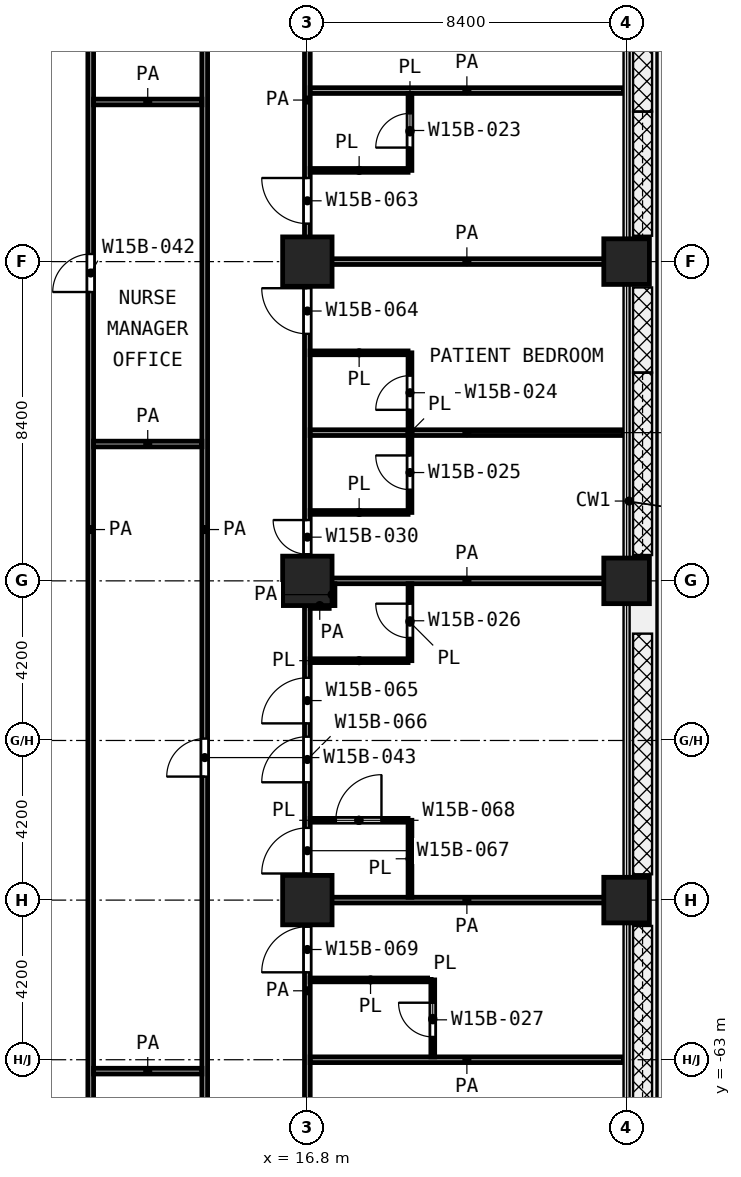
"""IFC4 building model, lengths in metres.
Left out: names, types, materials, properties, quantities, classifications, styles, units other than length and angle.
Written with IfcOpenShell. Run it as: python <this file> out.ifc"""

import sys

from ifc_helpers import new_model, si_unit, direction, frame, frame_2d, origin, origin_2d, place, context, subcontext, project, spatial, rectangle, extrude, element, fill, save


model = new_model("IFC4")
c1 = context("Model", 3, precision=1e-05, world=origin(), true_north=direction((0.0, 1.0)))
c2 = subcontext(c1, "Body", "Model", "MODEL_VIEW")
j1 = project(units=[si_unit("LENGTHUNIT", "METRE"), si_unit("PLANEANGLEUNIT", "RADIAN")], contexts=[c1])
p1 = place(None, origin())
s1 = spatial("IfcSite", under=j1, at=p1, CompositionType="ELEMENT")
p2 = place(p1, origin())
s2 = spatial("IfcBuilding", under=s1, at=p2, CompositionType="ELEMENT")
p3 = place(p2, frame((0.0, 0.0, 85.4)))
s3 = spatial("IfcBuildingStorey", under=s2, at=p3, CompositionType="ELEMENT", Elevation=85.4)
p4 = place(p3, frame((16.8, -42.0, 0.0), z_axis=(0.0, 0.0, 1.0), x_axis=(1.0, 0.0, 0.0)))
e1 = element("IfcColumn", 1, at=p4, inside=s3, PredefinedType="COLUMN", context=c2, shape_type="SweptSolid", body=[
    extrude(rectangle(XDim=1.3, YDim=1.3, at=origin_2d()), origin(), (0.0, 0.0, 1.0), 4.2),
])
p5 = place(p3, frame((25.2, -42.0, 0.0), z_axis=(0.0, 0.0, 1.0), x_axis=(1.0, 0.0, 0.0)))
e2 = element("IfcColumn", 2, at=p5, inside=s3, PredefinedType="COLUMN", context=c2, shape_type="SweptSolid", body=[
    extrude(rectangle(XDim=1.2, YDim=1.2, at=origin_2d()), origin(), (0.0, 0.0, 1.0), 4.2),
])
p6 = place(p3, frame((16.8, -50.4, 0.0), z_axis=(0.0, 0.0, 1.0), x_axis=(1.0, 0.0, 0.0)))
e3 = element("IfcColumn", 3, at=p6, inside=s3, PredefinedType="COLUMN", context=c2, shape_type="SweptSolid", body=[
    extrude(rectangle(XDim=1.3, YDim=1.3, at=origin_2d()), origin(), (0.0, 0.0, 1.0), 4.2),
])
p7 = place(p3, frame((25.2, -50.4, 0.0), z_axis=(0.0, 0.0, 1.0), x_axis=(1.0, 0.0, 0.0)))
e4 = element("IfcColumn", 4, at=p7, inside=s3, PredefinedType="COLUMN", context=c2, shape_type="SweptSolid", body=[
    extrude(rectangle(XDim=1.2, YDim=1.2, at=origin_2d()), origin(), (0.0, 0.0, 1.0), 4.2),
])
p8 = place(p3, frame((16.8, -58.8, 0.0), z_axis=(0.0, 0.0, 1.0), x_axis=(1.0, 0.0, 0.0)))
e5 = element("IfcColumn", 5, at=p8, inside=s3, PredefinedType="COLUMN", context=c2, shape_type="SweptSolid", body=[
    extrude(rectangle(XDim=1.3, YDim=1.3, at=origin_2d()), origin(), (0.0, 0.0, 1.0), 4.2),
])
p9 = place(p3, frame((25.2, -58.8, 0.0), z_axis=(0.0, 0.0, 1.0), x_axis=(1.0, 0.0, 0.0)))
e6 = element("IfcColumn", 6, at=p9, inside=s3, PredefinedType="COLUMN", context=c2, shape_type="SweptSolid", body=[
    extrude(rectangle(XDim=1.2, YDim=1.2, at=origin_2d()), origin(), (0.0, 0.0, 1.0), 4.2),
])
p10 = place(p3, frame((16.875, -60.9, 0.0), z_axis=(0.0, 0.0, 1.0), x_axis=(1.0, 0.0, 0.0)))
e7 = element("IfcWall", 7, at=p10, inside=s3, PredefinedType="PARTITIONING", context=c2, shape_type="SweptSolid", body=[
    extrude(rectangle(XDim=3.175, YDim=0.1, at=frame_2d((1.587, 0.0))), origin(), (0.0, 0.0, 1.0), 3.9),
])
p11 = place(p3, frame((16.875, -56.7, 0.0), z_axis=(0.0, 0.0, 1.0), x_axis=(1.0, 0.0, 0.0)))
e8 = element("IfcWall", 8, at=p11, inside=s3, PredefinedType="PARTITIONING", context=c2, shape_type="SweptSolid", body=[
    extrude(rectangle(XDim=2.575, YDim=0.1, at=frame_2d((1.288, 0.0))), origin(), (0.0, 0.0, 1.0), 3.9),
])
p12 = place(p11, frame((0.675, 0.0, 0.0)))
e9 = element("IfcOpeningElement", 9, at=p12, cuts=e8, PredefinedType="OPENING", context=c2, shape_type="SweptSolid", body=[
    extrude(rectangle(XDim=1.2, YDim=2.1, at=frame_2d((0.6, 1.05))), frame((0.0, 0.06, 0.0), z_axis=(0.0, -1.0, 0.0), x_axis=(1.0, 0.0, 0.0)), (0.0, 0.0, 1.0), 0.12),
])
for number, where, z_axis, x_axis in (
    (10, (16.875, -52.5, 0.0), (0.0, 0.0, 1.0), (1.0, 0.0, 0.0)),
    (11, (16.875, -48.6, 0.0), (0.0, 0.0, 1.0), (1.0, 0.0, 0.0)),
    (12, (16.875, -44.4, 0.0), (0.0, 0.0, 1.0), (1.0, 0.0, 0.0)),
    (13, (16.875, -39.6, 0.0), (0.0, 0.0, 1.0), (1.0, 0.0, 0.0)),
):
    element("IfcWall", number, at=place(p3, frame(where, z_axis=z_axis, x_axis=x_axis)), inside=s3, PredefinedType="PARTITIONING", context=c2, shape_type="SweptSolid", body=[
        extrude(rectangle(XDim=2.575, YDim=0.1, at=frame_2d((1.288, 0.0))), origin(), (0.0, 0.0, 1.0), 3.9),
    ])
p13 = place(p3, frame((19.5, -58.725, 0.0), z_axis=(0.0, 0.0, 1.0), x_axis=(0.0, 1.0, 0.0)))
e14 = element("IfcWall", 14, at=p13, inside=s3, PredefinedType="PARTITIONING", context=c2, shape_type="SweptSolid", body=[
    extrude(rectangle(XDim=2.025, YDim=0.1, at=frame_2d((1.013, 0.0))), origin(), (0.0, 0.0, 1.0), 3.9),
])
p14 = place(p3, frame((19.5, -52.5, 0.0), z_axis=(0.0, 0.0, 1.0), x_axis=(0.0, 1.0, 0.0)))
e15 = element("IfcWall", 15, at=p14, inside=s3, PredefinedType="PARTITIONING", context=c2, shape_type="SweptSolid", body=[
    extrude(rectangle(XDim=2.025, YDim=0.1, at=frame_2d((1.012, 0.0))), origin(), (0.0, 0.0, 1.0), 3.9),
])
p15 = place(p14, frame((0.6, 0.0, 0.0)))
e16 = element("IfcOpeningElement", 16, at=p15, cuts=e15, PredefinedType="OPENING", context=c2, shape_type="SweptSolid", body=[
    extrude(rectangle(XDim=0.9, YDim=2.1, at=frame_2d((0.45, 1.05))), frame((0.0, 0.06, 0.0), z_axis=(0.0, -1.0, 0.0), x_axis=(1.0, 0.0, 0.0)), (0.0, 0.0, 1.0), 0.12),
])
p16 = place(p3, frame((19.5, -48.6, 0.0), z_axis=(0.0, 0.0, 1.0), x_axis=(0.0, 1.0, 0.0)))
e17 = element("IfcWall", 17, at=p16, inside=s3, PredefinedType="PARTITIONING", context=c2, shape_type="SweptSolid", body=[
    extrude(rectangle(XDim=4.2, YDim=0.1, at=frame_2d((2.1, 0.0))), origin(), (0.0, 0.0, 1.0), 3.9),
])
p17 = place(p16, frame((2.7, 0.0, 0.0)))
e18 = element("IfcOpeningElement", 18, at=p17, cuts=e17, PredefinedType="OPENING", context=c2, shape_type="SweptSolid", body=[
    extrude(rectangle(XDim=0.9, YDim=2.1, at=frame_2d((0.45, 1.05))), frame((0.0, 0.06, 0.0), z_axis=(0.0, -1.0, 0.0), x_axis=(1.0, 0.0, 0.0)), (0.0, 0.0, 1.0), 0.12),
])
p18 = place(p16, frame((0.6, 0.0, 0.0)))
e19 = element("IfcOpeningElement", 19, at=p18, cuts=e17, PredefinedType="OPENING", context=c2, shape_type="SweptSolid", body=[
    extrude(rectangle(XDim=0.9, YDim=2.1, at=frame_2d((0.45, 1.05))), frame((0.0, 0.06, 0.0), z_axis=(0.0, -1.0, 0.0), x_axis=(1.0, 0.0, 0.0)), (0.0, 0.0, 1.0), 0.12),
])
p19 = place(p3, frame((19.5, -39.6, 0.0), z_axis=(0.0, 0.0, 1.0), x_axis=(0.0, 1.0, 0.0)))
e20 = element("IfcWall", 20, at=p19, inside=s3, PredefinedType="PARTITIONING", context=c2, shape_type="SweptSolid", body=[
    extrude(rectangle(XDim=2.025, YDim=0.1, at=frame_2d((1.013, 0.0))), origin(), (0.0, 0.0, 1.0), 3.9),
])
p20 = place(p19, frame((0.6, 0.0, 0.0)))
e21 = element("IfcOpeningElement", 21, at=p20, cuts=e20, PredefinedType="OPENING", context=c2, shape_type="SweptSolid", body=[
    extrude(rectangle(XDim=0.9, YDim=2.1, at=frame_2d((0.45, 1.05))), frame((0.0, 0.06, 0.0), z_axis=(0.0, -1.0, 0.0), x_axis=(1.0, 0.0, 0.0)), (0.0, 0.0, 1.0), 0.12),
])
p21 = place(p3, frame((20.1, -62.925, 0.0), z_axis=(0.0, 0.0, 1.0), x_axis=(0.0, 1.0, 0.0)))
e22 = element("IfcWall", 22, at=p21, inside=s3, PredefinedType="PARTITIONING", context=c2, shape_type="SweptSolid", body=[
    extrude(rectangle(XDim=2.025, YDim=0.1, at=frame_2d((1.013, 0.0))), origin(), (0.0, 0.0, 1.0), 3.9),
])
p22 = place(p21, frame((0.525, 0.0, 0.0)))
e23 = element("IfcOpeningElement", 23, at=p22, cuts=e22, PredefinedType="OPENING", context=c2, shape_type="SweptSolid", body=[
    extrude(rectangle(XDim=0.9, YDim=2.1, at=frame_2d((0.45, 1.05))), frame((0.0, 0.06, 0.0), z_axis=(0.0, -1.0, 0.0), x_axis=(1.0, 0.0, 0.0)), (0.0, 0.0, 1.0), 0.12),
])
p23 = place(p3, frame((11.175, -63.3, 0.0), z_axis=(0.0, 0.0, 1.0), x_axis=(1.0, 0.0, 0.0)))
e24 = element("IfcWall", 24, at=p23, inside=s3, PredefinedType="PARTITIONING", context=c2, shape_type="SweptSolid", body=[
    extrude(rectangle(XDim=2.85, YDim=0.15, at=frame_2d((1.425, 0.0))), origin(), (0.0, 0.0, 1.0), 3.9),
])
for number, where, z_axis, x_axis in (
    (25, (16.875, -63.0, 0.0), (0.0, 0.0, 1.0), (1.0, 0.0, 0.0)),
    (26, (16.875, -58.8, 0.0), (0.0, 0.0, 1.0), (1.0, 0.0, 0.0)),
):
    element("IfcWall", number, at=place(p3, frame(where, z_axis=z_axis, x_axis=x_axis)), inside=s3, PredefinedType="PARTITIONING", context=c2, shape_type="SweptSolid", body=[
        extrude(rectangle(XDim=8.245, YDim=0.15, at=frame_2d((4.123, 0.0))), origin(), (0.0, 0.0, 1.0), 3.9),
    ])
p24 = place(p3, frame((16.877, -51.05, 0.0), z_axis=(0.0, 0.0, 1.0), x_axis=(1.0, 0.0, 0.0)))
e27 = element("IfcWall", 27, at=p24, inside=s3, PredefinedType="PARTITIONING", context=c2, shape_type="SweptSolid", body=[
    extrude(rectangle(XDim=0.498, YDim=0.15, at=frame_2d((0.249, 0.0))), origin(), (0.0, 0.0, 1.0), 3.9),
])
p25 = place(p3, frame((16.877, -50.4, 0.0), z_axis=(0.0, 0.0, 1.0), x_axis=(1.0, 0.0, 0.0)))
e28 = element("IfcWall", 28, at=p25, inside=s3, PredefinedType="PARTITIONING", context=c2, shape_type="SweptSolid", body=[
    extrude(rectangle(XDim=8.243, YDim=0.15, at=frame_2d((4.122, 0.0))), origin(), (0.0, 0.0, 1.0), 3.9),
])
p26 = place(p3, frame((11.175, -46.8, 0.0), z_axis=(0.0, 0.0, 1.0), x_axis=(1.0, 0.0, 0.0)))
e29 = element("IfcWall", 29, at=p26, inside=s3, PredefinedType="PARTITIONING", context=c2, shape_type="SweptSolid", body=[
    extrude(rectangle(XDim=2.85, YDim=0.15, at=frame_2d((1.425, 0.0))), origin(), (0.0, 0.0, 1.0), 3.9),
])
for number, where, z_axis, x_axis in (
    (30, (16.875, -46.5, 0.0), (0.0, 0.0, 1.0), (1.0, 0.0, 0.0)),
    (31, (16.875, -42.0, 0.0), (0.0, 0.0, 1.0), (1.0, 0.0, 0.0)),
):
    element("IfcWall", number, at=place(p3, frame(where, z_axis=z_axis, x_axis=x_axis)), inside=s3, PredefinedType="PARTITIONING", context=c2, shape_type="SweptSolid", body=[
        extrude(rectangle(XDim=8.245, YDim=0.15, at=frame_2d((4.123, 0.0))), origin(), (0.0, 0.0, 1.0), 3.9),
    ])
p27 = place(p3, frame((11.175, -37.8, 0.0), z_axis=(0.0, 0.0, 1.0), x_axis=(1.0, 0.0, 0.0)))
e32 = element("IfcWall", 32, at=p27, inside=s3, PredefinedType="PARTITIONING", context=c2, shape_type="SweptSolid", body=[
    extrude(rectangle(XDim=2.85, YDim=0.15, at=frame_2d((1.425, 0.0))), origin(), (0.0, 0.0, 1.0), 3.9),
])
p28 = place(p3, frame((16.875, -37.5, 0.0), z_axis=(0.0, 0.0, 1.0), x_axis=(1.0, 0.0, 0.0)))
e33 = element("IfcWall", 33, at=p28, inside=s3, PredefinedType="PARTITIONING", context=c2, shape_type="SweptSolid", body=[
    extrude(rectangle(XDim=8.245, YDim=0.15, at=frame_2d((4.123, 0.0))), origin(), (0.0, 0.0, 1.0), 3.9),
])
p29 = place(p3, frame((11.1, -68.7, 0.0), z_axis=(0.0, 0.0, 1.0), x_axis=(0.0, 1.0, 0.0)))
e34 = element("IfcWall", 34, at=p29, inside=s3, PredefinedType="PARTITIONING", context=c2, shape_type="SweptSolid", body=[
    extrude(rectangle(XDim=39.3, YDim=0.15, at=frame_2d((19.65, 0.0))), origin(), (0.0, 0.0, 1.0), 3.9),
])
p30 = place(p29, frame((34.6, 0.0, 0.0)))
e35 = element("IfcOpeningElement", 35, at=p30, cuts=e34, PredefinedType="OPENING", context=c2, shape_type="SweptSolid", body=[
    extrude(rectangle(XDim=1.0, YDim=2.1, at=frame_2d((0.5, 1.05))), frame((0.0, 0.085, 0.0), z_axis=(0.0, -1.0, 0.0), x_axis=(1.0, 0.0, 0.0)), (0.0, 0.0, 1.0), 0.17),
])
p31 = place(p29, frame((25.9, 0.0, 0.0)))
e36 = element("IfcOpeningElement", 36, at=p31, cuts=e34, PredefinedType="OPENING", context=c2, shape_type="SweptSolid", body=[
    extrude(rectangle(XDim=1.0, YDim=2.1, at=frame_2d((0.5, 1.05))), frame((0.0, 0.085, 0.0), z_axis=(0.0, -1.0, 0.0), x_axis=(1.0, 0.0, 0.0)), (0.0, 0.0, 1.0), 0.17),
])
p32 = place(p29, frame((2.2, 0.0, 0.0)))
e37 = element("IfcOpeningElement", 37, at=p32, cuts=e34, PredefinedType="OPENING", context=c2, shape_type="SweptSolid", body=[
    extrude(rectangle(XDim=1.0, YDim=2.1, at=frame_2d((0.5, 1.05))), frame((0.0, 0.085, 0.0), z_axis=(0.0, -1.0, 0.0), x_axis=(1.0, 0.0, 0.0)), (0.0, 0.0, 1.0), 0.17),
])
p33 = place(p3, frame((14.1, -68.7, 0.0), z_axis=(0.0, 0.0, 1.0), x_axis=(0.0, 1.0, 0.0)))
e38 = element("IfcWall", 38, at=p33, inside=s3, PredefinedType="PARTITIONING", context=c2, shape_type="SweptSolid", body=[
    extrude(rectangle(XDim=39.3, YDim=0.15, at=frame_2d((19.65, 0.0))), origin(), (0.0, 0.0, 1.0), 3.9),
])
p34 = place(p33, frame((13.15, 0.0, 0.0)))
e39 = element("IfcOpeningElement", 39, at=p34, cuts=e38, PredefinedType="OPENING", context=c2, shape_type="SweptSolid", body=[
    extrude(rectangle(XDim=1.0, YDim=2.1, at=frame_2d((0.5, 1.05))), frame((0.0, 0.085, 0.0), z_axis=(0.0, -1.0, 0.0), x_axis=(1.0, 0.0, 0.0)), (0.0, 0.0, 1.0), 0.17),
])
p35 = place(p3, frame((16.8, -71.32, 0.0), z_axis=(0.0, 0.0, 1.0), x_axis=(0.0, 1.0, 0.0)))
e40 = element("IfcWall", 40, at=p35, inside=s3, PredefinedType="PARTITIONING", context=c2, shape_type="SweptSolid", body=[
    extrude(rectangle(XDim=20.268, YDim=0.15, at=frame_2d((10.134, 0.0))), origin(), (0.0, 0.0, 1.0), 3.9),
])
p36 = place(p35, frame((17.17, 0.0, 0.0)))
e41 = element("IfcOpeningElement", 41, at=p36, cuts=e40, PredefinedType="OPENING", context=c2, shape_type="SweptSolid", body=[
    extrude(rectangle(XDim=1.2, YDim=2.1, at=frame_2d((0.6, 1.05))), frame((0.0, 0.085, 0.0), z_axis=(0.0, -1.0, 0.0), x_axis=(1.0, 0.0, 0.0)), (0.0, 0.0, 1.0), 0.17),
])
p37 = place(p35, frame((15.62, 0.0, 0.0)))
e42 = element("IfcOpeningElement", 42, at=p37, cuts=e40, PredefinedType="OPENING", context=c2, shape_type="SweptSolid", body=[
    extrude(rectangle(XDim=1.2, YDim=2.1, at=frame_2d((0.6, 1.05))), frame((0.0, 0.085, 0.0), z_axis=(0.0, -1.0, 0.0), x_axis=(1.0, 0.0, 0.0)), (0.0, 0.0, 1.0), 0.17),
])
p38 = place(p35, frame((13.22, 0.0, 0.0)))
e43 = element("IfcOpeningElement", 43, at=p38, cuts=e40, PredefinedType="OPENING", context=c2, shape_type="SweptSolid", body=[
    extrude(rectangle(XDim=1.2, YDim=2.1, at=frame_2d((0.6, 1.05))), frame((0.0, 0.085, 0.0), z_axis=(0.0, -1.0, 0.0), x_axis=(1.0, 0.0, 0.0)), (0.0, 0.0, 1.0), 0.17),
])
p39 = place(p35, frame((10.62, 0.0, 0.0)))
e44 = element("IfcOpeningElement", 44, at=p39, cuts=e40, PredefinedType="OPENING", context=c2, shape_type="SweptSolid", body=[
    extrude(rectangle(XDim=1.2, YDim=2.1, at=frame_2d((0.6, 1.05))), frame((0.0, 0.085, 0.0), z_axis=(0.0, -1.0, 0.0), x_axis=(1.0, 0.0, 0.0)), (0.0, 0.0, 1.0), 0.17),
])
p40 = place(p35, frame((4.87, 0.0, 0.0)))
e45 = element("IfcOpeningElement", 45, at=p40, cuts=e40, PredefinedType="OPENING", context=c2, shape_type="SweptSolid", body=[
    extrude(rectangle(XDim=1.5, YDim=2.1, at=frame_2d((0.75, 1.05))), frame((0.0, 0.085, 0.0), z_axis=(0.0, -1.0, 0.0), x_axis=(1.0, 0.0, 0.0)), (0.0, 0.0, 1.0), 0.17),
])
p41 = place(p3, frame((16.8, -50.398, 0.0), z_axis=(0.0, 0.0, 1.0), x_axis=(0.0, 1.0, 0.0)))
e46 = element("IfcWall", 46, at=p41, inside=s3, PredefinedType="PARTITIONING", context=c2, shape_type="SweptSolid", body=[
    extrude(rectangle(XDim=25.298, YDim=0.15, at=frame_2d((12.649, 0.0))), origin(), (0.0, 0.0, 1.0), 3.9),
])
p42 = place(p41, frame((17.498, 0.0, 0.0)))
e47 = element("IfcOpeningElement", 47, at=p42, cuts=e46, PredefinedType="OPENING", context=c2, shape_type="SweptSolid", body=[
    extrude(rectangle(XDim=1.5, YDim=2.1, at=frame_2d((0.75, 1.05))), frame((0.0, 0.085, 0.0), z_axis=(0.0, -1.0, 0.0), x_axis=(1.0, 0.0, 0.0)), (0.0, 0.0, 1.0), 0.17),
])
p43 = place(p41, frame((9.398, 0.0, 0.0)))
e48 = element("IfcOpeningElement", 48, at=p43, cuts=e46, PredefinedType="OPENING", context=c2, shape_type="SweptSolid", body=[
    extrude(rectangle(XDim=1.2, YDim=2.1, at=frame_2d((0.6, 1.05))), frame((0.0, 0.085, 0.0), z_axis=(0.0, -1.0, 0.0), x_axis=(1.0, 0.0, 0.0)), (0.0, 0.0, 1.0), 0.17),
])
p44 = place(p41, frame((6.498, 0.0, 0.0)))
e49 = element("IfcOpeningElement", 49, at=p44, cuts=e46, PredefinedType="OPENING", context=c2, shape_type="SweptSolid", body=[
    extrude(rectangle(XDim=1.2, YDim=2.1, at=frame_2d((0.6, 1.05))), frame((0.0, 0.085, 0.0), z_axis=(0.0, -1.0, 0.0), x_axis=(1.0, 0.0, 0.0)), (0.0, 0.0, 1.0), 0.17),
])
p45 = place(p41, frame((0.698, 0.0, 0.0)))
e50 = element("IfcOpeningElement", 50, at=p45, cuts=e46, PredefinedType="OPENING", context=c2, shape_type="SweptSolid", body=[
    extrude(rectangle(XDim=0.9, YDim=2.1, at=frame_2d((0.45, 1.05))), frame((0.0, 0.085, 0.0), z_axis=(0.0, -1.0, 0.0), x_axis=(1.0, 0.0, 0.0)), (0.0, 0.0, 1.0), 0.17),
])
p46 = place(p3, frame((17.45, -51.05, 0.0), z_axis=(0.0, 0.0, 1.0), x_axis=(0.0, 1.0, 0.0)))
e51 = element("IfcWall", 51, at=p46, inside=s3, PredefinedType="PARTITIONING", context=c2, shape_type="SweptSolid", body=[
    extrude(rectangle(XDim=0.575, YDim=0.15, at=frame_2d((0.288, 0.0))), origin(), (0.0, 0.0, 1.0), 3.9),
])
p47 = place(p31, origin())
e52 = element("IfcDoor", 52, at=p47, inside=s3, OperationType="SINGLE_SWING_LEFT", PredefinedType="DOOR", context=c2, shape_type="SweptSolid", body=[
    extrude(rectangle(XDim=1.0, YDim=2.1, at=frame_2d((0.5, 1.05))), frame((0.0, 0.025, 0.0), z_axis=(0.0, -1.0, 0.0), x_axis=(1.0, 0.0, 0.0)), (0.0, 0.0, 1.0), 0.05),
])
fill(e36, e52)
p48 = place(p34, origin())
e53 = element("IfcDoor", 53, at=p48, inside=s3, OperationType="SINGLE_SWING_LEFT", PredefinedType="DOOR", context=c2, shape_type="SweptSolid", body=[
    extrude(rectangle(XDim=1.0, YDim=2.1, at=frame_2d((0.5, 1.05))), frame((0.0, 0.025, 0.0), z_axis=(0.0, -1.0, 0.0), x_axis=(1.0, 0.0, 0.0)), (0.0, 0.0, 1.0), 0.05),
])
fill(e39, e53)
p49 = place(p43, origin())
e54 = element("IfcDoor", 54, at=p49, inside=s3, OperationType="SINGLE_SWING_RIGHT", PredefinedType="DOOR", context=c2, shape_type="SweptSolid", body=[
    extrude(rectangle(XDim=1.2, YDim=2.1, at=frame_2d((0.6, 1.05))), frame((0.0, 0.025, 0.0), z_axis=(0.0, -1.0, 0.0), x_axis=(1.0, 0.0, 0.0)), (0.0, 0.0, 1.0), 0.05),
])
fill(e48, e54)
p50 = place(p20, origin())
e55 = element("IfcDoor", 55, at=p50, inside=s3, OperationType="SINGLE_SWING_LEFT", PredefinedType="DOOR", context=c2, shape_type="SweptSolid", body=[
    extrude(rectangle(XDim=0.9, YDim=2.1, at=frame_2d((0.45, 1.05))), frame((0.0, 0.025, 0.0), z_axis=(0.0, -1.0, 0.0), x_axis=(1.0, 0.0, 0.0)), (0.0, 0.0, 1.0), 0.05),
])
fill(e21, e55)
p51 = place(p44, origin())
e56 = element("IfcDoor", 56, at=p51, inside=s3, OperationType="SINGLE_SWING_RIGHT", PredefinedType="DOOR", context=c2, shape_type="SweptSolid", body=[
    extrude(rectangle(XDim=1.2, YDim=2.1, at=frame_2d((0.6, 1.05))), frame((0.0, 0.025, 0.0), z_axis=(0.0, -1.0, 0.0), x_axis=(1.0, 0.0, 0.0)), (0.0, 0.0, 1.0), 0.05),
])
fill(e49, e56)
p52 = place(p17, origin())
e57 = element("IfcDoor", 57, at=p52, inside=s3, OperationType="SINGLE_SWING_LEFT", PredefinedType="DOOR", context=c2, shape_type="SweptSolid", body=[
    extrude(rectangle(XDim=0.9, YDim=2.1, at=frame_2d((0.45, 1.05))), frame((0.0, 0.025, 0.0), z_axis=(0.0, -1.0, 0.0), x_axis=(1.0, 0.0, 0.0)), (0.0, 0.0, 1.0), 0.05),
])
fill(e18, e57)
p53 = place(p45, origin())
e58 = element("IfcDoor", 58, at=p53, inside=s3, OperationType="SINGLE_SWING_RIGHT", PredefinedType="DOOR", context=c2, shape_type="SweptSolid", body=[
    extrude(rectangle(XDim=0.9, YDim=2.1, at=frame_2d((0.45, 1.05))), frame((0.0, 0.025, 0.0), z_axis=(0.0, -1.0, 0.0), x_axis=(1.0, 0.0, 0.0)), (0.0, 0.0, 1.0), 0.05),
])
fill(e50, e58)
p54 = place(p18, origin())
e59 = element("IfcDoor", 59, at=p54, inside=s3, OperationType="SINGLE_SWING_RIGHT", PredefinedType="DOOR", context=c2, shape_type="SweptSolid", body=[
    extrude(rectangle(XDim=0.9, YDim=2.1, at=frame_2d((0.45, 1.05))), frame((0.0, 0.025, 0.0), z_axis=(0.0, -1.0, 0.0), x_axis=(1.0, 0.0, 0.0)), (0.0, 0.0, 1.0), 0.05),
])
fill(e19, e59)
p55 = place(p36, origin())
e60 = element("IfcDoor", 60, at=p55, inside=s3, OperationType="SINGLE_SWING_LEFT", PredefinedType="DOOR", context=c2, shape_type="SweptSolid", body=[
    extrude(rectangle(XDim=1.2, YDim=2.1, at=frame_2d((0.6, 1.05))), frame((0.0, 0.025, 0.0), z_axis=(0.0, -1.0, 0.0), x_axis=(1.0, 0.0, 0.0)), (0.0, 0.0, 1.0), 0.05),
])
fill(e41, e60)
p56 = place(p37, origin())
e61 = element("IfcDoor", 61, at=p56, inside=s3, OperationType="SINGLE_SWING_LEFT", PredefinedType="DOOR", context=c2, shape_type="SweptSolid", body=[
    extrude(rectangle(XDim=1.2, YDim=2.1, at=frame_2d((0.6, 1.05))), frame((0.0, 0.025, 0.0), z_axis=(0.0, -1.0, 0.0), x_axis=(1.0, 0.0, 0.0)), (0.0, 0.0, 1.0), 0.05),
])
fill(e42, e61)
p57 = place(p38, origin())
e62 = element("IfcDoor", 62, at=p57, inside=s3, OperationType="SINGLE_SWING_LEFT", PredefinedType="DOOR", context=c2, shape_type="SweptSolid", body=[
    extrude(rectangle(XDim=1.2, YDim=2.1, at=frame_2d((0.6, 1.05))), frame((0.0, 0.025, 0.0), z_axis=(0.0, -1.0, 0.0), x_axis=(1.0, 0.0, 0.0)), (0.0, 0.0, 1.0), 0.05),
])
fill(e43, e62)
p58 = place(p12, origin())
e63 = element("IfcDoor", 63, at=p58, inside=s3, OperationType="SINGLE_SWING_RIGHT", PredefinedType="DOOR", context=c2, shape_type="SweptSolid", body=[
    extrude(rectangle(XDim=1.2, YDim=2.1, at=frame_2d((0.6, 1.05))), frame((0.0, 0.025, 0.0), z_axis=(0.0, -1.0, 0.0), x_axis=(1.0, 0.0, 0.0)), (0.0, 0.0, 1.0), 0.05),
])
fill(e9, e63)
p59 = place(p15, origin())
e64 = element("IfcDoor", 64, at=p59, inside=s3, OperationType="SINGLE_SWING_RIGHT", PredefinedType="DOOR", context=c2, shape_type="SweptSolid", body=[
    extrude(rectangle(XDim=0.9, YDim=2.1, at=frame_2d((0.45, 1.05))), frame((0.0, 0.025, 0.0), z_axis=(0.0, -1.0, 0.0), x_axis=(1.0, 0.0, 0.0)), (0.0, 0.0, 1.0), 0.05),
])
fill(e16, e64)
p60 = place(p39, origin())
e65 = element("IfcDoor", 65, at=p60, inside=s3, OperationType="SINGLE_SWING_LEFT", PredefinedType="DOOR", context=c2, shape_type="SweptSolid", body=[
    extrude(rectangle(XDim=1.2, YDim=2.1, at=frame_2d((0.6, 1.05))), frame((0.0, 0.025, 0.0), z_axis=(0.0, -1.0, 0.0), x_axis=(1.0, 0.0, 0.0)), (0.0, 0.0, 1.0), 0.05),
])
fill(e44, e65)
p61 = place(p22, origin())
e66 = element("IfcDoor", 66, at=p61, inside=s3, OperationType="SINGLE_SWING_RIGHT", PredefinedType="DOOR", context=c2, shape_type="SweptSolid", body=[
    extrude(rectangle(XDim=0.9, YDim=2.1, at=frame_2d((0.45, 1.05))), frame((0.0, 0.025, 0.0), z_axis=(0.0, -1.0, 0.0), x_axis=(1.0, 0.0, 0.0)), (0.0, 0.0, 1.0), 0.05),
])
fill(e23, e66)
save(model, sys.argv[1])
